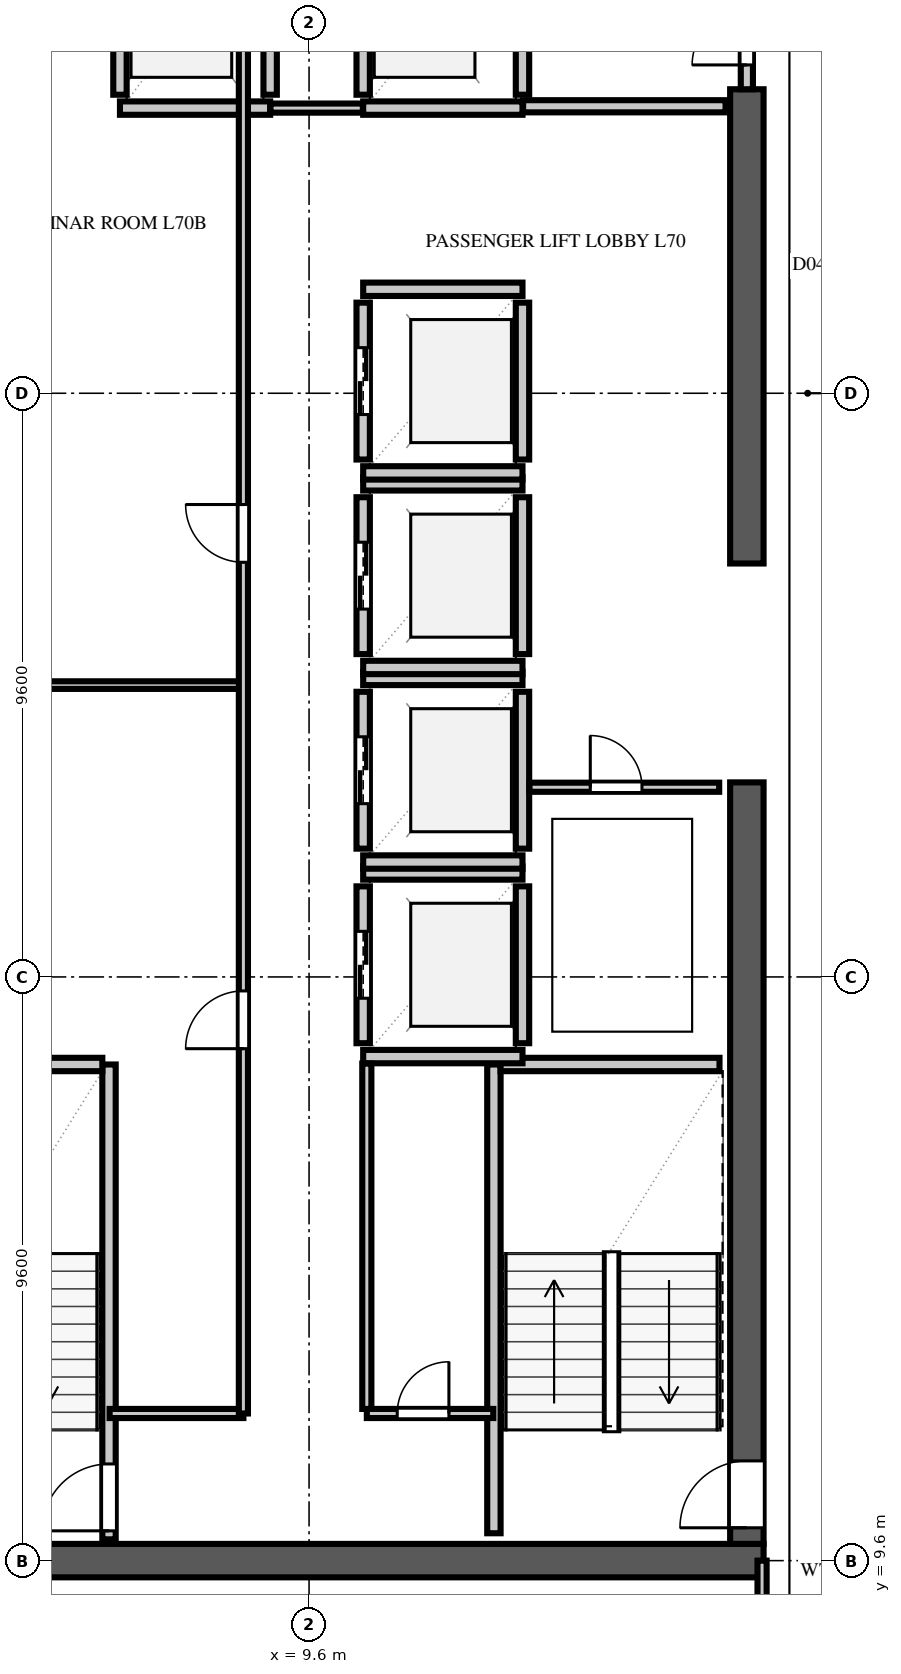
"""IFC4 building model, lengths in metres.
Left out: names, types, materials, properties, quantities, classifications, styles, units other than length and angle.
Written with IfcOpenShell. Run it as: python <this file> out.ifc"""

import sys

from ifc_helpers import new_model, si_unit, direction, frame, frame_2d, origin, place, context, subcontext, project, spatial, rectangle, extrude, element, fill, save


model = new_model("IFC4")
c1 = context("Model", 3, precision=1e-05, world=origin(), true_north=direction((0.0, 1.0)))
c2 = subcontext(c1, "Body", "Model", "MODEL_VIEW")
j1 = project(units=[si_unit("LENGTHUNIT", "METRE"), si_unit("PLANEANGLEUNIT", "RADIAN")], contexts=[c1])
p1 = place(None, origin())
s1 = spatial("IfcSite", under=j1, at=p1, CompositionType="ELEMENT")
p2 = place(p1, origin())
s2 = spatial("IfcBuilding", under=s1, at=p2, CompositionType="ELEMENT")
p3 = place(p2, frame((0.0, 0.0, 277.2)))
s3 = spatial("IfcBuildingStorey", under=s2, at=p3, CompositionType="ELEMENT", Elevation=277.2)
p4 = place(p3, frame((2.475, 9.6, 0.0), z_axis=(0.0, 0.0, 1.0), x_axis=(1.0, 0.0, 0.0)))
e1 = element("IfcWall", 1, at=p4, inside=s3, PredefinedType="SHEAR", context=c2, shape_type="SweptSolid", body=[
    extrude(rectangle(XDim=14.6, YDim=0.55, at=frame_2d((7.3, 0.0))), origin(), (0.0, 0.0, 1.0), 3.54),
])
p5 = place(p3, frame((16.8, 9.875, 0.0), z_axis=(0.0, 0.0, 1.0), x_axis=(0.0, 1.0, 0.0)))
e2 = element("IfcWall", 2, at=p5, inside=s3, PredefinedType="SHEAR", context=c2, shape_type="SweptSolid", body=[
    extrude(rectangle(XDim=12.525, YDim=0.55, at=frame_2d((6.262, 0.0))), origin(), (0.0, 0.0, 1.0), 3.54),
])
p6 = place(p5, frame((0.265, 0.0, 0.0)))
e3 = element("IfcOpeningElement", 3, at=p6, cuts=e2, PredefinedType="OPENING", context=c2, shape_type="SweptSolid", body=[
    extrude(rectangle(XDim=1.1, YDim=2.2, at=frame_2d((0.55, 1.1))), frame((0.0, 0.287, 0.0), z_axis=(0.0, -1.0, 0.0), x_axis=(1.0, 0.0, 0.0)), (0.0, 0.0, 1.0), 0.574),
])
p7 = place(p3, frame((16.8, 26.0, 0.0), z_axis=(0.0, 0.0, 1.0), x_axis=(0.0, 1.0, 0.0)))
e4 = element("IfcWall", 4, at=p7, inside=s3, PredefinedType="SHEAR", context=c2, shape_type="SweptSolid", body=[
    extrude(rectangle(XDim=7.8, YDim=0.55, at=frame_2d((3.9, 0.0))), origin(), (0.0, 0.0, 1.0), 3.54),
])
p8 = place(p3, frame((6.31, 9.95, 0.0), z_axis=(0.0, 0.0, 1.0), x_axis=(0.0, 1.0, 0.0)))
e5 = element("IfcWall", 5, at=p8, inside=s3, PredefinedType="SOLIDWALL", context=c2, shape_type="SweptSolid", body=[
    extrude(rectangle(XDim=7.81, YDim=0.22, at=frame_2d((3.905, 0.0))), origin(), (0.0, 0.0, 1.0), 3.54),
])
p9 = place(p8, frame((0.14, 0.0, 0.0)))
e6 = element("IfcOpeningElement", 6, at=p9, cuts=e5, PredefinedType="OPENING", context=c2, shape_type="SweptSolid", body=[
    extrude(rectangle(XDim=1.1, YDim=2.2, at=frame_2d((0.55, 1.1))), frame((0.0, 0.122, 0.0), z_axis=(0.0, -1.0, 0.0), x_axis=(1.0, 0.0, 0.0)), (0.0, 0.0, 1.0), 0.244),
])
p10 = place(p3, frame((2.65, 17.76, 0.0), z_axis=(0.0, 0.0, 1.0), x_axis=(1.0, 0.0, 0.0)))
e7 = element("IfcWall", 7, at=p10, inside=s3, PredefinedType="SOLIDWALL", context=c2, shape_type="SweptSolid", body=[
    extrude(rectangle(XDim=3.55, YDim=0.22, at=frame_2d((1.775, 0.0))), origin(), (0.0, 0.0, 1.0), 3.54),
])
p11 = place(p3, frame((12.64, 10.05, 0.0), z_axis=(0.0, 0.0, 1.0), x_axis=(0.0, 1.0, 0.0)))
e8 = element("IfcWall", 8, at=p11, inside=s3, PredefinedType="SOLIDWALL", context=c2, shape_type="SweptSolid", body=[
    extrude(rectangle(XDim=7.71, YDim=0.22, at=frame_2d((3.855, 0.0))), origin(), (0.0, 0.0, 1.0), 3.54),
])
p12 = place(p3, frame((12.75, 17.76, 0.0), z_axis=(0.0, 0.0, 1.0), x_axis=(1.0, 0.0, 0.0)))
e9 = element("IfcWall", 9, at=p12, inside=s3, PredefinedType="SOLIDWALL", context=c2, shape_type="SweptSolid", body=[
    extrude(rectangle(XDim=3.6, YDim=0.22, at=frame_2d((1.8, 0.0))), origin(), (0.0, 0.0, 1.0), 3.54),
])
p13 = place(p3, frame((10.49, 18.11, 0.0), z_axis=(0.0, 0.0, 1.0), x_axis=(0.0, 1.0, 0.0)))
e10 = element("IfcWall", 10, at=p13, inside=s3, PredefinedType="SOLIDWALL", context=c2, shape_type="SweptSolid", body=[
    extrude(rectangle(XDim=2.58, YDim=0.22, at=frame_2d((1.29, 0.0))), origin(), (0.0, 0.0, 1.0), 3.54),
])
p14 = place(p13, frame((0.74, 0.0, 0.0)))
e11 = element("IfcOpeningElement", 11, at=p14, cuts=e10, PredefinedType="OPENING", context=c2, shape_type="SweptSolid", body=[
    extrude(rectangle(XDim=1.1, YDim=2.2, at=frame_2d((0.55, 1.1))), frame((0.0, 0.122, 0.0), z_axis=(0.0, -1.0, 0.0), x_axis=(1.0, 0.0, 0.0)), (0.0, 0.0, 1.0), 0.244),
])
p15 = place(p3, frame((13.11, 18.11, 0.0), z_axis=(0.0, 0.0, 1.0), x_axis=(0.0, 1.0, 0.0)))
e12 = element("IfcWall", 12, at=p15, inside=s3, PredefinedType="SOLIDWALL", context=c2, shape_type="SweptSolid", body=[
    extrude(rectangle(XDim=2.58, YDim=0.22, at=frame_2d((1.29, 0.0))), origin(), (0.0, 0.0, 1.0), 3.54),
])
for number, where, z_axis, x_axis in (
    (13, (10.49, 17.89, 0.0), (0.0, 0.0, 1.0), (1.0, 0.0, 0.0)),
    (14, (10.49, 20.91, 0.0), (0.0, 0.0, 1.0), (1.0, 0.0, 0.0)),
):
    element("IfcWall", number, at=place(p3, frame(where, z_axis=z_axis, x_axis=x_axis)), inside=s3, PredefinedType="SOLIDWALL", context=c2, shape_type="SweptSolid", body=[
        extrude(rectangle(XDim=2.62, YDim=0.22, at=frame_2d((1.31, 0.0))), origin(), (0.0, 0.0, 1.0), 3.54),
    ])
p16 = place(p3, frame((10.49, 21.31, 0.0), z_axis=(0.0, 0.0, 1.0), x_axis=(0.0, 1.0, 0.0)))
e15 = element("IfcWall", 15, at=p16, inside=s3, PredefinedType="SOLIDWALL", context=c2, shape_type="SweptSolid", body=[
    extrude(rectangle(XDim=2.58, YDim=0.22, at=frame_2d((1.29, 0.0))), origin(), (0.0, 0.0, 1.0), 3.54),
])
p17 = place(p16, frame((0.74, 0.0, 0.0)))
e16 = element("IfcOpeningElement", 16, at=p17, cuts=e15, PredefinedType="OPENING", context=c2, shape_type="SweptSolid", body=[
    extrude(rectangle(XDim=1.1, YDim=2.2, at=frame_2d((0.55, 1.1))), frame((0.0, 0.122, 0.0), z_axis=(0.0, -1.0, 0.0), x_axis=(1.0, 0.0, 0.0)), (0.0, 0.0, 1.0), 0.244),
])
p18 = place(p3, frame((13.11, 21.31, 0.0), z_axis=(0.0, 0.0, 1.0), x_axis=(0.0, 1.0, 0.0)))
e17 = element("IfcWall", 17, at=p18, inside=s3, PredefinedType="SOLIDWALL", context=c2, shape_type="SweptSolid", body=[
    extrude(rectangle(XDim=2.58, YDim=0.22, at=frame_2d((1.29, 0.0))), origin(), (0.0, 0.0, 1.0), 3.54),
])
for number, where, z_axis, x_axis in (
    (18, (10.49, 21.09, 0.0), (0.0, 0.0, 1.0), (1.0, 0.0, 0.0)),
    (19, (10.49, 24.11, 0.0), (0.0, 0.0, 1.0), (1.0, 0.0, 0.0)),
):
    element("IfcWall", number, at=place(p3, frame(where, z_axis=z_axis, x_axis=x_axis)), inside=s3, PredefinedType="SOLIDWALL", context=c2, shape_type="SweptSolid", body=[
        extrude(rectangle(XDim=2.62, YDim=0.22, at=frame_2d((1.31, 0.0))), origin(), (0.0, 0.0, 1.0), 3.54),
    ])
p19 = place(p3, frame((10.49, 24.51, 0.0), z_axis=(0.0, 0.0, 1.0), x_axis=(0.0, 1.0, 0.0)))
e20 = element("IfcWall", 20, at=p19, inside=s3, PredefinedType="SOLIDWALL", context=c2, shape_type="SweptSolid", body=[
    extrude(rectangle(XDim=2.58, YDim=0.22, at=frame_2d((1.29, 0.0))), origin(), (0.0, 0.0, 1.0), 3.54),
])
p20 = place(p19, frame((0.74, 0.0, 0.0)))
e21 = element("IfcOpeningElement", 21, at=p20, cuts=e20, PredefinedType="OPENING", context=c2, shape_type="SweptSolid", body=[
    extrude(rectangle(XDim=1.1, YDim=2.2, at=frame_2d((0.55, 1.1))), frame((0.0, 0.122, 0.0), z_axis=(0.0, -1.0, 0.0), x_axis=(1.0, 0.0, 0.0)), (0.0, 0.0, 1.0), 0.244),
])
p21 = place(p3, frame((13.11, 24.51, 0.0), z_axis=(0.0, 0.0, 1.0), x_axis=(0.0, 1.0, 0.0)))
e22 = element("IfcWall", 22, at=p21, inside=s3, PredefinedType="SOLIDWALL", context=c2, shape_type="SweptSolid", body=[
    extrude(rectangle(XDim=2.58, YDim=0.22, at=frame_2d((1.29, 0.0))), origin(), (0.0, 0.0, 1.0), 3.54),
])
for number, where, z_axis, x_axis in (
    (23, (10.49, 24.29, 0.0), (0.0, 0.0, 1.0), (1.0, 0.0, 0.0)),
    (24, (10.49, 27.31, 0.0), (0.0, 0.0, 1.0), (1.0, 0.0, 0.0)),
):
    element("IfcWall", number, at=place(p3, frame(where, z_axis=z_axis, x_axis=x_axis)), inside=s3, PredefinedType="SOLIDWALL", context=c2, shape_type="SweptSolid", body=[
        extrude(rectangle(XDim=2.62, YDim=0.22, at=frame_2d((1.31, 0.0))), origin(), (0.0, 0.0, 1.0), 3.54),
    ])
p22 = place(p3, frame((10.49, 27.71, 0.0), z_axis=(0.0, 0.0, 1.0), x_axis=(0.0, 1.0, 0.0)))
e25 = element("IfcWall", 25, at=p22, inside=s3, PredefinedType="SOLIDWALL", context=c2, shape_type="SweptSolid", body=[
    extrude(rectangle(XDim=2.58, YDim=0.22, at=frame_2d((1.29, 0.0))), origin(), (0.0, 0.0, 1.0), 3.54),
])
p23 = place(p22, frame((0.74, 0.0, 0.0)))
e26 = element("IfcOpeningElement", 26, at=p23, cuts=e25, PredefinedType="OPENING", context=c2, shape_type="SweptSolid", body=[
    extrude(rectangle(XDim=1.1, YDim=2.2, at=frame_2d((0.55, 1.1))), frame((0.0, 0.122, 0.0), z_axis=(0.0, -1.0, 0.0), x_axis=(1.0, 0.0, 0.0)), (0.0, 0.0, 1.0), 0.244),
])
p24 = place(p3, frame((13.11, 27.71, 0.0), z_axis=(0.0, 0.0, 1.0), x_axis=(0.0, 1.0, 0.0)))
e27 = element("IfcWall", 27, at=p24, inside=s3, PredefinedType="SOLIDWALL", context=c2, shape_type="SweptSolid", body=[
    extrude(rectangle(XDim=2.58, YDim=0.22, at=frame_2d((1.29, 0.0))), origin(), (0.0, 0.0, 1.0), 3.54),
])
for number, where, z_axis, x_axis in (
    (28, (10.49, 27.49, 0.0), (0.0, 0.0, 1.0), (1.0, 0.0, 0.0)),
    (29, (10.49, 30.51, 0.0), (0.0, 0.0, 1.0), (1.0, 0.0, 0.0)),
):
    element("IfcWall", number, at=place(p3, frame(where, z_axis=z_axis, x_axis=x_axis)), inside=s3, PredefinedType="SOLIDWALL", context=c2, shape_type="SweptSolid", body=[
        extrude(rectangle(XDim=2.62, YDim=0.22, at=frame_2d((1.31, 0.0))), origin(), (0.0, 0.0, 1.0), 3.54),
    ])
for number, where, z_axis, x_axis in (
    (30, (6.49, 33.71, 0.0), (0.0, 0.0, 1.0), (0.0, 1.0, 0.0)),
    (31, (8.96, 33.71, 0.0), (0.0, 0.0, 1.0), (0.0, 1.0, 0.0)),
):
    element("IfcWall", number, at=place(p3, frame(where, z_axis=z_axis, x_axis=x_axis)), inside=s3, PredefinedType="SOLIDWALL", context=c2, shape_type="SweptSolid", body=[
        extrude(rectangle(XDim=2.78, YDim=0.22, at=frame_2d((1.39, 0.0))), origin(), (0.0, 0.0, 1.0), 3.54),
    ])
p25 = place(p3, frame((6.49, 33.49, 0.0), z_axis=(0.0, 0.0, 1.0), x_axis=(1.0, 0.0, 0.0)))
e32 = element("IfcWall", 32, at=p25, inside=s3, PredefinedType="SOLIDWALL", context=c2, shape_type="SweptSolid", body=[
    extrude(rectangle(XDim=2.47, YDim=0.22, at=frame_2d((1.235, 0.0))), origin(), (0.0, 0.0, 1.0), 3.54),
])
for number, where, z_axis, x_axis in (
    (33, (10.49, 33.71, 0.0), (0.0, 0.0, 1.0), (0.0, 1.0, 0.0)),
    (34, (13.11, 33.71, 0.0), (0.0, 0.0, 1.0), (0.0, 1.0, 0.0)),
):
    element("IfcWall", number, at=place(p3, frame(where, z_axis=z_axis, x_axis=x_axis)), inside=s3, PredefinedType="SOLIDWALL", context=c2, shape_type="SweptSolid", body=[
        extrude(rectangle(XDim=2.78, YDim=0.22, at=frame_2d((1.39, 0.0))), origin(), (0.0, 0.0, 1.0), 3.54),
    ])
p26 = place(p3, frame((10.49, 33.49, 0.0), z_axis=(0.0, 0.0, 1.0), x_axis=(1.0, 0.0, 0.0)))
e35 = element("IfcWall", 35, at=p26, inside=s3, PredefinedType="SOLIDWALL", context=c2, shape_type="SweptSolid", body=[
    extrude(rectangle(XDim=2.62, YDim=0.22, at=frame_2d((1.31, 0.0))), origin(), (0.0, 0.0, 1.0), 3.54),
])
p27 = place(p3, frame((13.12, 33.52, 0.0), z_axis=(0.0, 0.0, 1.0), x_axis=(1.0, 0.0, 0.0)))
e36 = element("IfcWall", 36, at=p27, inside=s3, PredefinedType="SOLIDWALL", context=c2, shape_type="SweptSolid", body=[
    extrude(rectangle(XDim=3.33, YDim=0.2, at=frame_2d((1.665, 0.0))), origin(), (0.0, 0.0, 1.0), 3.54),
])
p28 = place(p3, frame((16.8, 33.8, 0.0), z_axis=(0.0, 0.0, 1.0), x_axis=(0.0, 1.0, 0.0)))
e37 = element("IfcWall", 37, at=p28, inside=s3, PredefinedType="SOLIDWALL", context=c2, shape_type="SweptSolid", body=[
    extrude(rectangle(XDim=2.6, YDim=0.2, at=frame_2d((1.3, 0.0))), origin(), (0.0, 0.0, 1.0), 3.54),
])
p29 = place(p28, frame((0.4, 0.0, 0.0)))
e38 = element("IfcOpeningElement", 38, at=p29, cuts=e37, PredefinedType="OPENING", context=c2, shape_type="SweptSolid", body=[
    extrude(rectangle(XDim=1.8, YDim=2.2, at=frame_2d((0.9, 1.1))), frame((0.0, 0.112, 0.0), z_axis=(0.0, -1.0, 0.0), x_axis=(1.0, 0.0, 0.0)), (0.0, 0.0, 1.0), 0.224),
])
p30 = place(p3, frame((8.965, 33.49, 0.0), z_axis=(0.0, 0.0, 1.0), x_axis=(1.0, 0.0, 0.0)))
e39 = element("IfcWall", 39, at=p30, inside=s3, PredefinedType="PARTITIONING", context=c2, shape_type="SweptSolid", body=[
    extrude(rectangle(XDim=1.52, YDim=0.15, at=frame_2d((0.76, 0.0))), origin(), (0.0, 0.0, 1.0), 3.54),
])
p31 = place(p3, frame((10.55, 12.02, 0.0), z_axis=(0.0, 0.0, 1.0), x_axis=(1.0, 0.0, 0.0)))
e40 = element("IfcWall", 40, at=p31, inside=s3, PredefinedType="PARTITIONING", context=c2, shape_type="SweptSolid", body=[
    extrude(rectangle(XDim=2.08, YDim=0.15, at=frame_2d((1.04, 0.0))), origin(), (0.0, 0.0, 1.0), 3.54),
])
p32 = place(p31, frame((0.5, 0.0, 0.0)))
e41 = element("IfcOpeningElement", 41, at=p32, cuts=e40, PredefinedType="OPENING", context=c2, shape_type="SweptSolid", body=[
    extrude(rectangle(XDim=0.85, YDim=2.1, at=frame_2d((0.425, 1.05))), frame((0.0, 0.087, 0.0), z_axis=(0.0, -1.0, 0.0), x_axis=(1.0, 0.0, 0.0)), (0.0, 0.0, 1.0), 0.174),
])
p33 = place(p3, frame((10.55, 12.095, 0.0), z_axis=(0.0, 0.0, 1.0), x_axis=(0.0, 1.0, 0.0)))
e42 = element("IfcWall", 42, at=p33, inside=s3, PredefinedType="PARTITIONING", context=c2, shape_type="SweptSolid", body=[
    extrude(rectangle(XDim=5.68, YDim=0.15, at=frame_2d((2.84, 0.0))), origin(), (0.0, 0.0, 1.0), 3.54),
])
p34 = place(p3, frame((13.225, 22.32, 0.0), z_axis=(0.0, 0.0, 1.0), x_axis=(1.0, 0.0, 0.0)))
e43 = element("IfcWall", 43, at=p34, inside=s3, PredefinedType="PARTITIONING", context=c2, shape_type="SweptSolid", body=[
    extrude(rectangle(XDim=3.12, YDim=0.15, at=frame_2d((1.56, 0.0))), origin(), (0.0, 0.0, 1.0), 3.54),
])
p35 = place(p34, frame((1.0, 0.0, 0.0)))
e44 = element("IfcOpeningElement", 44, at=p35, cuts=e43, PredefinedType="OPENING", context=c2, shape_type="SweptSolid", body=[
    extrude(rectangle(XDim=0.85, YDim=2.1, at=frame_2d((0.425, 1.05))), frame((0.0, 0.087, 0.0), z_axis=(0.0, -1.0, 0.0), x_axis=(1.0, 0.0, 0.0)), (0.0, 0.0, 1.0), 0.174),
])
p36 = place(p3, frame((6.32, 12.02, 0.0), z_axis=(0.0, 0.0, 1.0), x_axis=(1.0, 0.0, 0.0)))
e45 = element("IfcWall", 45, at=p36, inside=s3, PredefinedType="PARTITIONING", context=c2, shape_type="SweptSolid", body=[
    extrude(rectangle(XDim=2.2, YDim=0.15, at=frame_2d((1.1, 0.0))), origin(), (0.0, 0.0, 1.0), 3.54),
])
p37 = place(p3, frame((2.65, 24.0, 0.0), z_axis=(0.0, 0.0, 1.0), x_axis=(1.0, 0.0, 0.0)))
e46 = element("IfcWall", 46, at=p37, inside=s3, PredefinedType="PARTITIONING", context=c2, shape_type="SweptSolid", body=[
    extrude(rectangle(XDim=5.87, YDim=0.125, at=frame_2d((2.935, 0.0))), origin(), (0.0, 0.0, 1.0), 3.54),
])
p38 = place(p3, frame((8.52, 12.02, 0.0), z_axis=(0.0, 0.0, 1.0), x_axis=(0.0, 1.0, 0.0)))
e47 = element("IfcWall", 47, at=p38, inside=s3, PredefinedType="PARTITIONING", context=c2, shape_type="SweptSolid", body=[
    extrude(rectangle(XDim=24.76, YDim=0.15, at=frame_2d((12.38, 0.0))), origin(), (0.0, 0.0, 1.0), 3.54),
])
p39 = place(p38, frame((6.0, 0.0, 0.0)))
e48 = element("IfcOpeningElement", 48, at=p39, cuts=e47, PredefinedType="OPENING", context=c2, shape_type="SweptSolid", body=[
    extrude(rectangle(XDim=0.95, YDim=2.15, at=frame_2d((0.475, 1.075))), frame((0.0, 0.087, 0.0), z_axis=(0.0, -1.0, 0.0), x_axis=(1.0, 0.0, 0.0)), (0.0, 0.0, 1.0), 0.174),
])
p40 = place(p38, frame((14.0, 0.0, 0.0)))
e49 = element("IfcOpeningElement", 49, at=p40, cuts=e47, PredefinedType="OPENING", context=c2, shape_type="SweptSolid", body=[
    extrude(rectangle(XDim=0.95, YDim=2.15, at=frame_2d((0.475, 1.075))), frame((0.0, 0.087, 0.0), z_axis=(0.0, -1.0, 0.0), x_axis=(1.0, 0.0, 0.0)), (0.0, 0.0, 1.0), 0.174),
])
p41 = place(p3, frame((17.05, 0.22, 0.0), z_axis=(0.0, 0.0, 1.0), x_axis=(0.0, 1.0, 0.0)))
e50 = element("IfcWall", 50, at=p41, inside=s3, PredefinedType="PARTITIONING", context=c2, shape_type="SweptSolid", body=[
    extrude(rectangle(XDim=9.38, YDim=0.15, at=frame_2d((4.69, 0.0))), origin(), (0.0, 0.0, 1.0), 3.54),
])
p42 = place(p41, frame((5.58, 0.0, 0.0)))
e51 = element("IfcOpeningElement", 51, at=p42, cuts=e50, PredefinedType="OPENING", context=c2, shape_type="SweptSolid", body=[
    extrude(rectangle(XDim=0.95, YDim=2.15, at=frame_2d((0.475, 1.075))), frame((0.0, 0.087, 0.0), z_axis=(0.0, -1.0, 0.0), x_axis=(1.0, 0.0, 0.0)), (0.0, 0.0, 1.0), 0.174),
])
p43 = place(p9, origin())
e52 = element("IfcDoor", 52, at=p43, inside=s3, OperationType="SINGLE_SWING_LEFT", PredefinedType="DOOR", context=c2, shape_type="SweptSolid", body=[
    extrude(rectangle(XDim=1.1, YDim=2.2, at=frame_2d((0.55, 1.1))), frame((0.0, 0.025, 0.0), z_axis=(0.0, -1.0, 0.0), x_axis=(1.0, 0.0, 0.0)), (0.0, 0.0, 1.0), 0.05),
])
fill(e6, e52)
p44 = place(p6, origin())
e53 = element("IfcDoor", 53, at=p44, inside=s3, OperationType="SINGLE_SWING_LEFT", PredefinedType="DOOR", context=c2, shape_type="SweptSolid", body=[
    extrude(rectangle(XDim=1.1, YDim=2.2, at=frame_2d((0.55, 1.1))), frame((0.0, 0.025, 0.0), z_axis=(0.0, -1.0, 0.0), x_axis=(1.0, 0.0, 0.0)), (0.0, 0.0, 1.0), 0.05),
])
fill(e3, e53)
p45 = place(p14, origin())
e54 = element("IfcDoor", 54, at=p45, inside=s3, OperationType="DOUBLE_DOOR_SLIDING", PredefinedType="DOOR", context=c2, shape_type="SweptSolid", body=[
    extrude(rectangle(XDim=1.1, YDim=2.2, at=frame_2d((0.55, 1.1))), frame((0.0, 0.025, 0.0), z_axis=(0.0, -1.0, 0.0), x_axis=(1.0, 0.0, 0.0)), (0.0, 0.0, 1.0), 0.05),
])
fill(e11, e54)
p46 = place(p17, origin())
e55 = element("IfcDoor", 55, at=p46, inside=s3, OperationType="DOUBLE_DOOR_SLIDING", PredefinedType="DOOR", context=c2, shape_type="SweptSolid", body=[
    extrude(rectangle(XDim=1.1, YDim=2.2, at=frame_2d((0.55, 1.1))), frame((0.0, 0.025, 0.0), z_axis=(0.0, -1.0, 0.0), x_axis=(1.0, 0.0, 0.0)), (0.0, 0.0, 1.0), 0.05),
])
fill(e16, e55)
p47 = place(p20, origin())
e56 = element("IfcDoor", 56, at=p47, inside=s3, OperationType="DOUBLE_DOOR_SLIDING", PredefinedType="DOOR", context=c2, shape_type="SweptSolid", body=[
    extrude(rectangle(XDim=1.1, YDim=2.2, at=frame_2d((0.55, 1.1))), frame((0.0, 0.025, 0.0), z_axis=(0.0, -1.0, 0.0), x_axis=(1.0, 0.0, 0.0)), (0.0, 0.0, 1.0), 0.05),
])
fill(e21, e56)
p48 = place(p23, origin())
e57 = element("IfcDoor", 57, at=p48, inside=s3, OperationType="DOUBLE_DOOR_SLIDING", PredefinedType="DOOR", context=c2, shape_type="SweptSolid", body=[
    extrude(rectangle(XDim=1.1, YDim=2.2, at=frame_2d((0.55, 1.1))), frame((0.0, 0.025, 0.0), z_axis=(0.0, -1.0, 0.0), x_axis=(1.0, 0.0, 0.0)), (0.0, 0.0, 1.0), 0.05),
])
fill(e26, e57)
p49 = place(p29, origin())
e58 = element("IfcDoor", 58, at=p49, inside=s3, OperationType="DOUBLE_DOOR_SINGLE_SWING", PredefinedType="DOOR", context=c2, shape_type="SweptSolid", body=[
    extrude(rectangle(XDim=1.8, YDim=2.2, at=frame_2d((0.9, 1.1))), frame((0.0, 0.025, 0.0), z_axis=(0.0, -1.0, 0.0), x_axis=(1.0, 0.0, 0.0)), (0.0, 0.0, 1.0), 0.05),
])
fill(e38, e58)
p50 = place(p32, origin())
e59 = element("IfcDoor", 59, at=p50, inside=s3, OperationType="SINGLE_SWING_RIGHT", PredefinedType="DOOR", context=c2, shape_type="SweptSolid", body=[
    extrude(rectangle(XDim=0.85, YDim=2.1, at=frame_2d((0.425, 1.05))), frame((0.0, 0.025, 0.0), z_axis=(0.0, -1.0, 0.0), x_axis=(1.0, 0.0, 0.0)), (0.0, 0.0, 1.0), 0.05),
])
fill(e41, e59)
p51 = place(p35, origin())
e60 = element("IfcDoor", 60, at=p51, inside=s3, OperationType="SINGLE_SWING_LEFT", PredefinedType="DOOR", context=c2, shape_type="SweptSolid", body=[
    extrude(rectangle(XDim=0.85, YDim=2.1, at=frame_2d((0.425, 1.05))), frame((0.0, 0.025, 0.0), z_axis=(0.0, -1.0, 0.0), x_axis=(1.0, 0.0, 0.0)), (0.0, 0.0, 1.0), 0.05),
])
fill(e44, e60)
p52 = place(p39, origin())
e61 = element("IfcDoor", 61, at=p52, inside=s3, OperationType="SINGLE_SWING_LEFT", PredefinedType="DOOR", context=c2, shape_type="SweptSolid", body=[
    extrude(rectangle(XDim=0.95, YDim=2.15, at=frame_2d((0.475, 1.075))), frame((0.0, 0.025, 0.0), z_axis=(0.0, -1.0, 0.0), x_axis=(1.0, 0.0, 0.0)), (0.0, 0.0, 1.0), 0.05),
])
fill(e48, e61)
p53 = place(p40, origin())
e62 = element("IfcDoor", 62, at=p53, inside=s3, OperationType="SINGLE_SWING_RIGHT", PredefinedType="DOOR", context=c2, shape_type="SweptSolid", body=[
    extrude(rectangle(XDim=0.95, YDim=2.15, at=frame_2d((0.475, 1.075))), frame((0.0, 0.025, 0.0), z_axis=(0.0, -1.0, 0.0), x_axis=(1.0, 0.0, 0.0)), (0.0, 0.0, 1.0), 0.05),
])
fill(e49, e62)
save(model, sys.argv[1])
